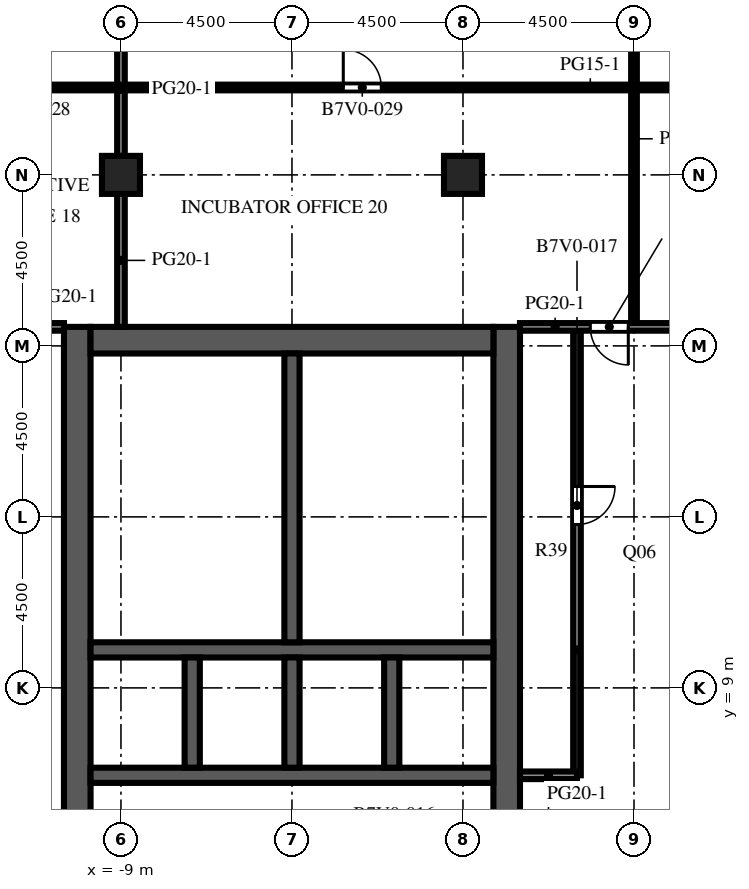
"""IFC4 building model, lengths in metres.
Left out: names, types, materials, properties, quantities, classifications, styles, units other than length and angle.
Written with IfcOpenShell. Run it as: python <this file> out.ifc"""

import sys

from ifc_helpers import new_model, si_unit, direction, frame, frame_2d, origin, origin_2d, place, context, subcontext, project, spatial, rectangle, extrude, element, fill, save


model = new_model("IFC4")
c1 = context("Model", 3, precision=1e-05, world=origin(), true_north=direction((0.0, 1.0)))
c2 = subcontext(c1, "Body", "Model", "MODEL_VIEW")
j1 = project(units=[si_unit("LENGTHUNIT", "METRE"), si_unit("PLANEANGLEUNIT", "RADIAN")], contexts=[c1])
p1 = place(None, origin())
s1 = spatial("IfcSite", under=j1, at=p1, CompositionType="ELEMENT")
p2 = place(p1, origin())
s2 = spatial("IfcBuilding", under=s1, at=p2, CompositionType="ELEMENT")
p3 = place(p2, frame((0.0, 0.0, 235.7)))
s3 = spatial("IfcBuildingStorey", under=s2, at=p3, CompositionType="ELEMENT", Elevation=235.7)
for number, where, z_axis, x_axis in (
    (1, (-9.0, 22.5, 0.0), (0.0, 0.0, 1.0), (1.0, 0.0, 0.0)),
    (2, (0.0, 22.5, 0.0), (0.0, 0.0, 1.0), (1.0, 0.0, 0.0)),
):
    element("IfcColumn", number, at=place(p3, frame(where, z_axis=z_axis, x_axis=x_axis)), inside=s3, PredefinedType="COLUMN", context=c2, shape_type="SweptSolid", body=[
        extrude(rectangle(XDim=1.0, YDim=1.0, at=origin_2d()), origin(), (0.0, 0.0, 1.0), 4.1),
    ])
p4 = place(p3, frame((-10.15, -9.0, 0.0), z_axis=(0.0, 0.0, 1.0), x_axis=(0.0, 1.0, 0.0)))
e3 = element("IfcWall", 3, at=p4, inside=s3, PredefinedType="SHEAR", context=c2, shape_type="SweptSolid", body=[
    extrude(rectangle(XDim=27.5, YDim=0.7, at=frame_2d((13.75, 0.0))), origin(), (0.0, 0.0, 1.0), 4.1),
])
p5 = place(p4, frame((12.55, 0.0, 0.0)))
e4 = element("IfcOpeningElement", 4, at=p5, cuts=e3, PredefinedType="OPENING", context=c2, shape_type="SweptSolid", body=[
    extrude(rectangle(XDim=2.4, YDim=2.4, at=frame_2d((1.2, 1.2))), frame((0.0, 0.36, 0.0), z_axis=(0.0, -1.0, 0.0), x_axis=(1.0, 0.0, 0.0)), (0.0, 0.0, 1.0), 0.72),
])
p6 = place(p4, frame((6.825, 0.0, 0.0)))
e5 = element("IfcOpeningElement", 5, at=p6, cuts=e3, PredefinedType="OPENING", context=c2, shape_type="SweptSolid", body=[
    extrude(rectangle(XDim=1.2, YDim=2.1, at=frame_2d((0.6, 1.05))), frame((0.0, 0.36, 0.0), z_axis=(0.0, -1.0, 0.0), x_axis=(1.0, 0.0, 0.0)), (0.0, 0.0, 1.0), 0.72),
])
p7 = place(p4, frame((19.475, 0.0, 0.0)))
e6 = element("IfcOpeningElement", 6, at=p7, cuts=e3, PredefinedType="OPENING", context=c2, shape_type="SweptSolid", body=[
    extrude(rectangle(XDim=1.2, YDim=2.1, at=frame_2d((0.6, 1.05))), frame((0.0, 0.36, 0.0), z_axis=(0.0, -1.0, 0.0), x_axis=(1.0, 0.0, 0.0)), (0.0, 0.0, 1.0), 0.72),
])
p8 = place(p3, frame((1.15, -9.0, 0.0), z_axis=(0.0, 0.0, 1.0), x_axis=(0.0, 1.0, 0.0)))
e7 = element("IfcWall", 7, at=p8, inside=s3, PredefinedType="SHEAR", context=c2, shape_type="SweptSolid", body=[
    extrude(rectangle(XDim=27.5, YDim=0.7, at=frame_2d((13.75, 0.0))), origin(), (0.0, 0.0, 1.0), 4.1),
])
p9 = place(p8, frame((12.55, 0.0, 0.0)))
e8 = element("IfcOpeningElement", 8, at=p9, cuts=e7, PredefinedType="OPENING", context=c2, shape_type="SweptSolid", body=[
    extrude(rectangle(XDim=2.4, YDim=2.4, at=frame_2d((1.2, 1.2))), frame((0.0, 0.36, 0.0), z_axis=(0.0, -1.0, 0.0), x_axis=(1.0, 0.0, 0.0)), (0.0, 0.0, 1.0), 0.72),
])
p10 = place(p8, frame((5.42, 0.0, 0.0)))
e9 = element("IfcOpeningElement", 9, at=p10, cuts=e7, PredefinedType="OPENING", context=c2, shape_type="SweptSolid", body=[
    extrude(rectangle(XDim=1.2, YDim=2.1, at=frame_2d((0.6, 1.05))), frame((0.0, 0.36, 0.0), z_axis=(0.0, -1.0, 0.0), x_axis=(1.0, 0.0, 0.0)), (0.0, 0.0, 1.0), 0.72),
])
p11 = place(p8, frame((19.46, 0.0, 0.0)))
e10 = element("IfcOpeningElement", 10, at=p11, cuts=e7, PredefinedType="OPENING", context=c2, shape_type="SweptSolid", body=[
    extrude(rectangle(XDim=1.0, YDim=2.1, at=frame_2d((0.5, 1.05))), frame((0.0, 0.36, 0.0), z_axis=(0.0, -1.0, 0.0), x_axis=(1.0, 0.0, 0.0)), (0.0, 0.0, 1.0), 0.72),
])
p12 = place(p8, frame((21.17, 0.0, 0.0)))
e11 = element("IfcOpeningElement", 11, at=p12, cuts=e7, PredefinedType="OPENING", context=c2, shape_type="SweptSolid", body=[
    extrude(rectangle(XDim=1.0, YDim=2.1, at=frame_2d((0.5, 1.05))), frame((0.0, 0.36, 0.0), z_axis=(0.0, -1.0, 0.0), x_axis=(1.0, 0.0, 0.0)), (0.0, 0.0, 1.0), 0.72),
])
p13 = place(p8, frame((23.26, 0.0, 0.0)))
e12 = element("IfcOpeningElement", 12, at=p13, cuts=e7, PredefinedType="OPENING", context=c2, shape_type="SweptSolid", body=[
    extrude(rectangle(XDim=1.0, YDim=2.1, at=frame_2d((0.5, 1.05))), frame((0.0, 0.36, 0.0), z_axis=(0.0, -1.0, 0.0), x_axis=(1.0, 0.0, 0.0)), (0.0, 0.0, 1.0), 0.72),
])
p14 = place(p8, frame((25.35, 0.0, 0.0)))
e13 = element("IfcOpeningElement", 13, at=p14, cuts=e7, PredefinedType="OPENING", context=c2, shape_type="SweptSolid", body=[
    extrude(rectangle(XDim=1.0, YDim=2.1, at=frame_2d((0.5, 1.05))), frame((0.0, 0.36, 0.0), z_axis=(0.0, -1.0, 0.0), x_axis=(1.0, 0.0, 0.0)), (0.0, 0.0, 1.0), 0.72),
])
p15 = place(p3, frame((-9.8, 18.15, 0.0), z_axis=(0.0, 0.0, 1.0), x_axis=(1.0, 0.0, 0.0)))
e14 = element("IfcWall", 14, at=p15, inside=s3, PredefinedType="SHEAR", context=c2, shape_type="SweptSolid", body=[
    extrude(rectangle(XDim=10.6, YDim=0.7, at=frame_2d((5.3, 0.0))), origin(), (0.0, 0.0, 1.0), 4.1),
])
p16 = place(p3, frame((-9.8, 6.7, 0.0), z_axis=(0.0, 0.0, 1.0), x_axis=(1.0, 0.0, 0.0)))
e15 = element("IfcWall", 15, at=p16, inside=s3, PredefinedType="SHEAR", context=c2, shape_type="SweptSolid", body=[
    extrude(rectangle(XDim=10.6, YDim=0.4, at=frame_2d((5.3, 0.0))), origin(), (0.0, 0.0, 1.0), 4.1),
])
p17 = place(p16, frame((3.438, 0.0, 0.0)))
e16 = element("IfcOpeningElement", 16, at=p17, cuts=e15, PredefinedType="OPENING", context=c2, shape_type="SweptSolid", body=[
    extrude(rectangle(XDim=1.1, YDim=2.1, at=frame_2d((0.55, 1.05))), frame((0.0, 0.21, 0.0), z_axis=(0.0, -1.0, 0.0), x_axis=(1.0, 0.0, 0.0)), (0.0, 0.0, 1.0), 0.42),
])
p18 = place(p16, frame((6.062, 0.0, 0.0)))
e17 = element("IfcOpeningElement", 17, at=p18, cuts=e15, PredefinedType="OPENING", context=c2, shape_type="SweptSolid", body=[
    extrude(rectangle(XDim=1.1, YDim=2.1, at=frame_2d((0.55, 1.05))), frame((0.0, 0.21, 0.0), z_axis=(0.0, -1.0, 0.0), x_axis=(1.0, 0.0, 0.0)), (0.0, 0.0, 1.0), 0.42),
])
p19 = place(p16, frame((8.812, 0.0, 0.0)))
e18 = element("IfcOpeningElement", 18, at=p19, cuts=e15, PredefinedType="OPENING", context=c2, shape_type="SweptSolid", body=[
    extrude(rectangle(XDim=1.1, YDim=2.1, at=frame_2d((0.55, 1.05))), frame((0.0, 0.21, 0.0), z_axis=(0.0, -1.0, 0.0), x_axis=(1.0, 0.0, 0.0)), (0.0, 0.0, 1.0), 0.42),
])
p20 = place(p16, frame((0.738, 0.0, 0.0)))
e19 = element("IfcOpeningElement", 19, at=p20, cuts=e15, PredefinedType="OPENING", context=c2, shape_type="SweptSolid", body=[
    extrude(rectangle(XDim=1.0, YDim=2.1, at=frame_2d((0.5, 1.05))), frame((0.0, 0.21, 0.0), z_axis=(0.0, -1.0, 0.0), x_axis=(1.0, 0.0, 0.0)), (0.0, 0.0, 1.0), 0.42),
])
p21 = place(p3, frame((-9.8, 10.0, 0.0), z_axis=(0.0, 0.0, 1.0), x_axis=(1.0, 0.0, 0.0)))
e20 = element("IfcWall", 20, at=p21, inside=s3, PredefinedType="SHEAR", context=c2, shape_type="SweptSolid", body=[
    extrude(rectangle(XDim=10.6, YDim=0.4, at=frame_2d((5.3, 0.0))), origin(), (0.0, 0.0, 1.0), 4.1),
])
for number, where, z_axis, x_axis in (
    (21, (-7.125, 6.9, 0.0), (0.0, 0.0, 1.0), (0.0, 1.0, 0.0)),
    (22, (-4.5, 6.9, 0.0), (0.0, 0.0, 1.0), (0.0, 1.0, 0.0)),
    (23, (-1.875, 6.9, 0.0), (0.0, 0.0, 1.0), (0.0, 1.0, 0.0)),
):
    element("IfcWall", number, at=place(p3, frame(where, z_axis=z_axis, x_axis=x_axis)), inside=s3, PredefinedType="SHEAR", context=c2, shape_type="SweptSolid", body=[
        extrude(rectangle(XDim=2.9, YDim=0.4, at=frame_2d((1.45, 0.0))), origin(), (0.0, 0.0, 1.0), 4.1),
    ])
p22 = place(p3, frame((-4.5, 10.2, 0.0), z_axis=(0.0, 0.0, 1.0), x_axis=(0.0, 1.0, 0.0)))
e24 = element("IfcWall", 24, at=p22, inside=s3, PredefinedType="SHEAR", context=c2, shape_type="SweptSolid", body=[
    extrude(rectangle(XDim=7.6, YDim=0.4, at=frame_2d((3.8, 0.0))), origin(), (0.0, 0.0, 1.0), 4.1),
])
for number, where, z_axis, x_axis in (
    (25, (-4.3, 11.72, 0.0), (0.0, 0.0, 1.0), (1.0, 0.0, 0.0)),
    (26, (-4.3, 13.62, 0.0), (0.0, 0.0, 1.0), (1.0, 0.0, 0.0)),
    (27, (-4.3, 15.9, 0.0), (0.0, 0.0, 1.0), (1.0, 0.0, 0.0)),
):
    element("IfcWall", number, at=place(p3, frame(where, z_axis=z_axis, x_axis=x_axis)), inside=s3, PredefinedType="PARTITIONING", context=c2, shape_type="SweptSolid", body=[
        extrude(rectangle(XDim=5.1, YDim=0.1, at=frame_2d((2.55, 0.0))), origin(), (0.0, 0.0, 1.0), 3.65),
    ])
for number, where, z_axis, x_axis in (
    (28, (-9.0, 18.5, 0.0), (0.0, 0.0, 1.0), (0.0, 1.0, 0.0)),
    (29, (-9.0, 23.0, 0.0), (0.0, 0.0, 1.0), (0.0, 1.0, 0.0)),
):
    element("IfcWall", number, at=place(p3, frame(where, z_axis=z_axis, x_axis=x_axis)), inside=s3, PredefinedType="PARTITIONING", context=c2, shape_type="SweptSolid", body=[
        extrude(rectangle(XDim=3.5, YDim=0.2, at=frame_2d((1.75, 0.0))), origin(), (0.0, 0.0, 1.0), 3.65),
    ])
p23 = place(p3, frame((3.0, 6.7, 0.0), z_axis=(0.0, 0.0, 1.0), x_axis=(0.0, 1.0, 0.0)))
e30 = element("IfcWall", 30, at=p23, inside=s3, PredefinedType="PARTITIONING", context=c2, shape_type="SweptSolid", body=[
    extrude(rectangle(XDim=11.8, YDim=0.2, at=frame_2d((5.9, 0.0))), origin(), (0.0, 0.0, 1.0), 3.65),
])
p24 = place(p23, frame((6.6, 0.0, 0.0)))
e31 = element("IfcOpeningElement", 31, at=p24, cuts=e30, PredefinedType="OPENING", context=c2, shape_type="SweptSolid", body=[
    extrude(rectangle(XDim=1.0, YDim=2.1, at=frame_2d((0.5, 1.05))), frame((0.0, 0.11, 0.0), z_axis=(0.0, -1.0, 0.0), x_axis=(1.0, 0.0, 0.0)), (0.0, 0.0, 1.0), 0.22),
])
p25 = place(p3, frame((4.5, 31.1, 0.0), z_axis=(0.0, 0.0, 1.0), x_axis=(0.0, -1.0, 0.0)))
e32 = element("IfcWall", 32, at=p25, inside=s3, PredefinedType="PARTITIONING", context=c2, shape_type="SweptSolid", body=[
    extrude(rectangle(XDim=12.6, YDim=0.15, at=frame_2d((6.3, 0.0))), origin(), (0.0, 0.0, 1.0), 3.65),
])
p26 = place(p25, frame((1.7, 0.0, 0.0)))
e33 = element("IfcOpeningElement", 33, at=p26, cuts=e32, PredefinedType="OPENING", context=c2, shape_type="SweptSolid", body=[
    extrude(rectangle(XDim=1.0, YDim=2.1, at=frame_2d((0.5, 1.05))), frame((0.0, 0.085, 0.0), z_axis=(0.0, -1.0, 0.0), x_axis=(1.0, 0.0, 0.0)), (0.0, 0.0, 1.0), 0.17),
])
p27 = place(p3, frame((1.5, 6.7, 0.0), z_axis=(0.0, 0.0, 1.0), x_axis=(1.0, 0.0, 0.0)))
e34 = element("IfcWall", 34, at=p27, inside=s3, PredefinedType="PARTITIONING", context=c2, shape_type="SweptSolid", body=[
    extrude(rectangle(XDim=1.5, YDim=0.2, at=frame_2d((0.75, 0.0))), origin(), (0.0, 0.0, 1.0), 3.65),
])
p28 = place(p3, frame((-13.5, 18.5, 0.0), z_axis=(0.0, 0.0, 1.0), x_axis=(1.0, 0.0, 0.0)))
e35 = element("IfcWall", 35, at=p28, inside=s3, PredefinedType="PARTITIONING", context=c2, shape_type="SweptSolid", body=[
    extrude(rectangle(XDim=3.0, YDim=0.2, at=frame_2d((1.5, 0.0))), origin(), (0.0, 0.0, 1.0), 3.65),
])
p29 = place(p28, frame((0.6, 0.0, 0.0)))
e36 = element("IfcOpeningElement", 36, at=p29, cuts=e35, PredefinedType="OPENING", context=c2, shape_type="SweptSolid", body=[
    extrude(rectangle(XDim=1.0, YDim=2.1, at=frame_2d((0.5, 1.05))), frame((0.0, 0.11, 0.0), z_axis=(0.0, -1.0, 0.0), x_axis=(1.0, 0.0, 0.0)), (0.0, 0.0, 1.0), 0.22),
])
p30 = place(p3, frame((1.5, 18.5, 0.0), z_axis=(0.0, 0.0, 1.0), x_axis=(1.0, 0.0, 0.0)))
e37 = element("IfcWall", 37, at=p30, inside=s3, PredefinedType="PARTITIONING", context=c2, shape_type="SweptSolid", body=[
    extrude(rectangle(XDim=4.5, YDim=0.2, at=frame_2d((2.25, 0.0))), origin(), (0.0, 0.0, 1.0), 3.65),
])
p31 = place(p30, frame((1.85, 0.0, 0.0)))
e38 = element("IfcOpeningElement", 38, at=p31, cuts=e37, PredefinedType="OPENING", context=c2, shape_type="SweptSolid", body=[
    extrude(rectangle(XDim=1.0, YDim=2.1, at=frame_2d((0.5, 1.05))), frame((0.0, 0.11, 0.0), z_axis=(0.0, -1.0, 0.0), x_axis=(1.0, 0.0, 0.0)), (0.0, 0.0, 1.0), 0.22),
])
p32 = place(p3, frame((-13.5, 24.8, 0.0), z_axis=(0.0, 0.0, 1.0), x_axis=(1.0, 0.0, 0.0)))
e39 = element("IfcWall", 39, at=p32, inside=s3, PredefinedType="PARTITIONING", context=c2, shape_type="SweptSolid", body=[
    extrude(rectangle(XDim=34.5, YDim=0.15, at=frame_2d((17.25, 0.0))), origin(), (0.0, 0.0, 1.0), 3.65),
])
p33 = place(p32, frame((1.6, 0.0, 0.0)))
e40 = element("IfcOpeningElement", 40, at=p33, cuts=e39, PredefinedType="OPENING", context=c2, shape_type="SweptSolid", body=[
    extrude(rectangle(XDim=1.0, YDim=2.1, at=frame_2d((0.5, 1.05))), frame((0.0, 0.085, 0.0), z_axis=(0.0, -1.0, 0.0), x_axis=(1.0, 0.0, 0.0)), (0.0, 0.0, 1.0), 0.17),
])
p34 = place(p32, frame((10.35, 0.0, 0.0)))
e41 = element("IfcOpeningElement", 41, at=p34, cuts=e39, PredefinedType="OPENING", context=c2, shape_type="SweptSolid", body=[
    extrude(rectangle(XDim=1.0, YDim=2.1, at=frame_2d((0.5, 1.05))), frame((0.0, 0.085, 0.0), z_axis=(0.0, -1.0, 0.0), x_axis=(1.0, 0.0, 0.0)), (0.0, 0.0, 1.0), 0.17),
])
p35 = place(p32, frame((22.35, 0.0, 0.0)))
e42 = element("IfcOpeningElement", 42, at=p35, cuts=e39, PredefinedType="OPENING", context=c2, shape_type="SweptSolid", body=[
    extrude(rectangle(XDim=1.0, YDim=2.1, at=frame_2d((0.5, 1.05))), frame((0.0, 0.085, 0.0), z_axis=(0.0, -1.0, 0.0), x_axis=(1.0, 0.0, 0.0)), (0.0, 0.0, 1.0), 0.17),
])
p36 = place(p32, frame((31.1, 0.0, 0.0)))
e43 = element("IfcOpeningElement", 43, at=p36, cuts=e39, PredefinedType="OPENING", context=c2, shape_type="SweptSolid", body=[
    extrude(rectangle(XDim=1.0, YDim=2.1, at=frame_2d((0.5, 1.05))), frame((0.0, 0.085, 0.0), z_axis=(0.0, -1.0, 0.0), x_axis=(1.0, 0.0, 0.0)), (0.0, 0.0, 1.0), 0.17),
])
p37 = place(p17, origin())
e44 = element("IfcDoor", 44, at=p37, inside=s3, OperationType="DOUBLE_DOOR_SLIDING", PredefinedType="DOOR", context=c2, shape_type="SweptSolid", body=[
    extrude(rectangle(XDim=1.1, YDim=2.1, at=frame_2d((0.55, 1.05))), frame((0.0, 0.025, 0.0), z_axis=(0.0, -1.0, 0.0), x_axis=(1.0, 0.0, 0.0)), (0.0, 0.0, 1.0), 0.05),
])
fill(e16, e44)
p38 = place(p18, origin())
e45 = element("IfcDoor", 45, at=p38, inside=s3, OperationType="DOUBLE_DOOR_SLIDING", PredefinedType="DOOR", context=c2, shape_type="SweptSolid", body=[
    extrude(rectangle(XDim=1.1, YDim=2.1, at=frame_2d((0.55, 1.05))), frame((0.0, 0.025, 0.0), z_axis=(0.0, -1.0, 0.0), x_axis=(1.0, 0.0, 0.0)), (0.0, 0.0, 1.0), 0.05),
])
fill(e17, e45)
p39 = place(p19, origin())
e46 = element("IfcDoor", 46, at=p39, inside=s3, OperationType="DOUBLE_DOOR_SLIDING", PredefinedType="DOOR", context=c2, shape_type="SweptSolid", body=[
    extrude(rectangle(XDim=1.1, YDim=2.1, at=frame_2d((0.55, 1.05))), frame((0.0, 0.025, 0.0), z_axis=(0.0, -1.0, 0.0), x_axis=(1.0, 0.0, 0.0)), (0.0, 0.0, 1.0), 0.05),
])
fill(e18, e46)
p40 = place(p5, origin())
e47 = element("IfcDoor", 47, at=p40, inside=s3, OperationType="DOUBLE_DOOR_DOUBLE_SWING", PredefinedType="DOOR", context=c2, shape_type="SweptSolid", body=[
    extrude(rectangle(XDim=2.4, YDim=2.4, at=frame_2d((1.2, 1.2))), frame((0.0, 0.025, 0.0), z_axis=(0.0, -1.0, 0.0), x_axis=(1.0, 0.0, 0.0)), (0.0, 0.0, 1.0), 0.05),
])
fill(e4, e47)
p41 = place(p9, origin())
e48 = element("IfcDoor", 48, at=p41, inside=s3, OperationType="DOUBLE_DOOR_DOUBLE_SWING", PredefinedType="DOOR", context=c2, shape_type="SweptSolid", body=[
    extrude(rectangle(XDim=2.4, YDim=2.4, at=frame_2d((1.2, 1.2))), frame((0.0, 0.025, 0.0), z_axis=(0.0, -1.0, 0.0), x_axis=(1.0, 0.0, 0.0)), (0.0, 0.0, 1.0), 0.05),
])
fill(e8, e48)
p42 = place(p7, origin())
e49 = element("IfcDoor", 49, at=p42, inside=s3, OperationType="SINGLE_SWING_LEFT", PredefinedType="DOOR", context=c2, shape_type="SweptSolid", body=[
    extrude(rectangle(XDim=1.2, YDim=2.1, at=frame_2d((0.6, 1.05))), frame((0.0, 0.025, 0.0), z_axis=(0.0, -1.0, 0.0), x_axis=(1.0, 0.0, 0.0)), (0.0, 0.0, 1.0), 0.05),
])
fill(e6, e49)
p43 = place(p20, origin())
e50 = element("IfcDoor", 50, at=p43, inside=s3, OperationType="SINGLE_SWING_LEFT", PredefinedType="DOOR", context=c2, shape_type="SweptSolid", body=[
    extrude(rectangle(XDim=1.0, YDim=2.1, at=frame_2d((0.5, 1.05))), frame((0.0, 0.025, 0.0), z_axis=(0.0, -1.0, 0.0), x_axis=(1.0, 0.0, 0.0)), (0.0, 0.0, 1.0), 0.05),
])
fill(e19, e50)
p44 = place(p11, origin())
e51 = element("IfcDoor", 51, at=p44, inside=s3, OperationType="SINGLE_SWING_LEFT", PredefinedType="DOOR", context=c2, shape_type="SweptSolid", body=[
    extrude(rectangle(XDim=1.0, YDim=2.1, at=frame_2d((0.5, 1.05))), frame((0.0, 0.325, 0.0), z_axis=(0.0, -1.0, 0.0), x_axis=(1.0, 0.0, 0.0)), (0.0, 0.0, 1.0), 0.05),
])
fill(e10, e51)
p45 = place(p12, origin())
e52 = element("IfcDoor", 52, at=p45, inside=s3, OperationType="SINGLE_SWING_RIGHT", PredefinedType="DOOR", context=c2, shape_type="SweptSolid", body=[
    extrude(rectangle(XDim=1.0, YDim=2.1, at=frame_2d((0.5, 1.05))), frame((0.0, 0.325, 0.0), z_axis=(0.0, -1.0, 0.0), x_axis=(1.0, 0.0, 0.0)), (0.0, 0.0, 1.0), 0.05),
])
fill(e11, e52)
p46 = place(p13, origin())
e53 = element("IfcDoor", 53, at=p46, inside=s3, OperationType="SINGLE_SWING_LEFT", PredefinedType="DOOR", context=c2, shape_type="SweptSolid", body=[
    extrude(rectangle(XDim=1.0, YDim=2.1, at=frame_2d((0.5, 1.05))), frame((0.0, 0.325, 0.0), z_axis=(0.0, -1.0, 0.0), x_axis=(1.0, 0.0, 0.0)), (0.0, 0.0, 1.0), 0.05),
])
fill(e12, e53)
p47 = place(p14, origin())
e54 = element("IfcDoor", 54, at=p47, inside=s3, OperationType="SINGLE_SWING_RIGHT", PredefinedType="DOOR", context=c2, shape_type="SweptSolid", body=[
    extrude(rectangle(XDim=1.0, YDim=2.1, at=frame_2d((0.5, 1.05))), frame((0.0, 0.325, 0.0), z_axis=(0.0, -1.0, 0.0), x_axis=(1.0, 0.0, 0.0)), (0.0, 0.0, 1.0), 0.05),
])
fill(e13, e54)
p48 = place(p24, origin())
e55 = element("IfcDoor", 55, at=p48, inside=s3, OperationType="SINGLE_SWING_RIGHT", PredefinedType="DOOR", context=c2, shape_type="SweptSolid", body=[
    extrude(rectangle(XDim=1.0, YDim=2.1, at=frame_2d((0.5, 1.05))), frame((0.0, 0.025, 0.0), z_axis=(0.0, -1.0, 0.0), x_axis=(1.0, 0.0, 0.0)), (0.0, 0.0, 1.0), 0.05),
])
fill(e31, e55)
p49 = place(p31, origin())
e56 = element("IfcDoor", 56, at=p49, inside=s3, OperationType="SINGLE_SWING_RIGHT", PredefinedType="DOOR", context=c2, shape_type="SweptSolid", body=[
    extrude(rectangle(XDim=1.0, YDim=2.1, at=frame_2d((0.5, 1.05))), frame((0.0, 0.025, 0.0), z_axis=(0.0, -1.0, 0.0), x_axis=(1.0, 0.0, 0.0)), (0.0, 0.0, 1.0), 0.05),
])
fill(e38, e56)
p50 = place(p34, origin())
e57 = element("IfcDoor", 57, at=p50, inside=s3, OperationType="SINGLE_SWING_LEFT", PredefinedType="DOOR", context=c2, shape_type="SweptSolid", body=[
    extrude(rectangle(XDim=1.0, YDim=2.1, at=frame_2d((0.5, 1.05))), frame((0.0, 0.025, 0.0), z_axis=(0.0, -1.0, 0.0), x_axis=(1.0, 0.0, 0.0)), (0.0, 0.0, 1.0), 0.05),
])
fill(e41, e57)
save(model, sys.argv[1])
